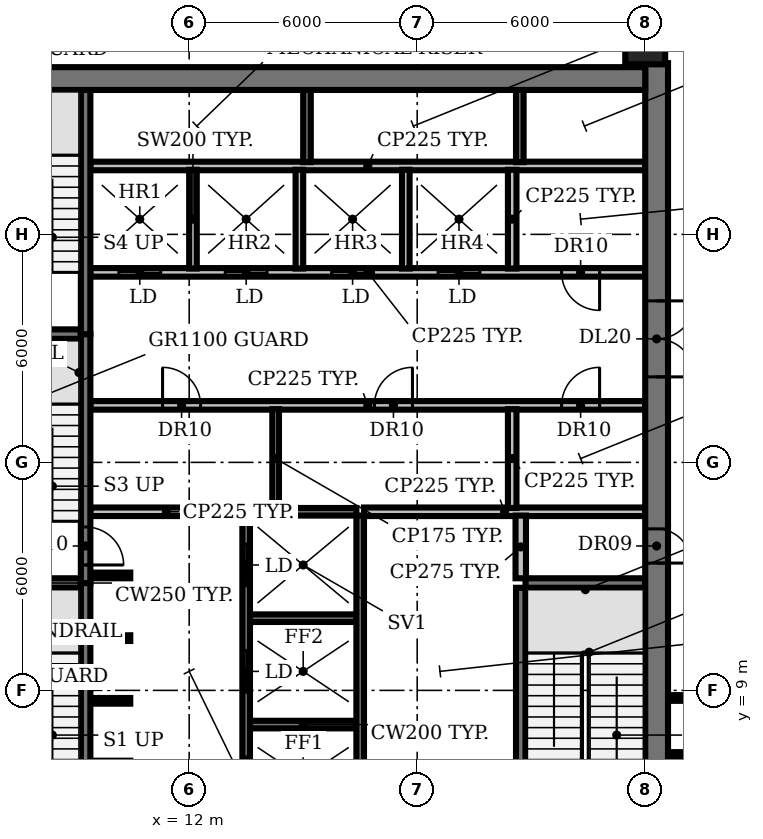
"""IFC4 building model, lengths in metres.
Left out: names, types, materials, properties, quantities, classifications, styles, units other than length and angle.
Written with IfcOpenShell. Run it as: python <this file> out.ifc"""

import sys

from ifc_helpers import new_model, si_unit, direction, frame, frame_2d, origin, origin_2d, place, context, subcontext, project, spatial, rectangle, circle, extrude, element, fill, save


model = new_model("IFC4")
c1 = context("Model", 3, precision=1e-05, world=origin(), true_north=direction((0.0, 1.0)))
c2 = subcontext(c1, "Body", "Model", "MODEL_VIEW")
j1 = project(units=[si_unit("LENGTHUNIT", "METRE"), si_unit("PLANEANGLEUNIT", "RADIAN")], contexts=[c1])
p1 = place(None, origin())
s1 = spatial("IfcSite", under=j1, at=p1, CompositionType="ELEMENT")
p2 = place(p1, origin())
s2 = spatial("IfcBuilding", under=s1, at=p2, CompositionType="ELEMENT")
p3 = place(p2, frame((0.0, 0.0, 146.6)))
s3 = spatial("IfcBuildingStorey", under=s2, at=p3, CompositionType="ELEMENT", Elevation=146.6)
p4 = place(p3, frame((24.0, 26.0, -0.35), z_axis=(0.0, 0.0, 1.0), x_axis=(1.0, 0.0, 0.0)))
e1 = element("IfcColumn", 1, at=p4, inside=s3, PredefinedType="COLUMN", context=c2, shape_type="SweptSolid", body=[
    extrude(circle(Radius=0.525, at=origin_2d()), origin(), (0.0, 0.0, 1.0), 4.2),
])
p5 = place(p3, frame((13.6, 8.1, 0.0), z_axis=(0.0, 0.0, 1.0), x_axis=(1.0, 0.0, 0.0)))
e2 = element("IfcWall", 2, at=p5, inside=s3, PredefinedType="SHEAR", context=c2, shape_type="SweptSolid", body=[
    extrude(rectangle(XDim=2.8, YDim=0.2, at=frame_2d((1.4, 0.0))), origin(), (0.0, 0.0, 1.0), 3.85),
])
for number, where, z_axis, x_axis in (
    (3, (9.4, 8.725, 0.0), (0.0, 0.0, 1.0), (1.0, 0.0, 0.0)),
    (4, (9.4, 10.375, 0.0), (0.0, 0.0, 1.0), (1.0, 0.0, 0.0)),
):
    element("IfcWall", number, at=place(p3, frame(where, z_axis=z_axis, x_axis=x_axis)), inside=s3, PredefinedType="SHEAR", context=c2, shape_type="SweptSolid", body=[
        extrude(rectangle(XDim=1.05, YDim=0.15, at=frame_2d((0.525, 0.0))), origin(), (0.0, 0.0, 1.0), 3.85),
    ])
p6 = place(p3, frame((13.6, 10.9, 0.0), z_axis=(0.0, 0.0, 1.0), x_axis=(1.0, 0.0, 0.0)))
e5 = element("IfcWall", 5, at=p6, inside=s3, PredefinedType="SHEAR", context=c2, shape_type="SweptSolid", body=[
    extrude(rectangle(XDim=2.8, YDim=0.2, at=frame_2d((1.4, 0.0))), origin(), (0.0, 0.0, 1.0), 3.85),
])
for number, where, z_axis, x_axis in (
    (6, (6.0, 11.825, 0.0), (0.0, 0.0, 1.0), (1.0, 0.0, 0.0)),
    (7, (20.85, 11.825, 0.0), (0.0, 0.0, 1.0), (1.0, 0.0, 0.0)),
):
    element("IfcWall", number, at=place(p3, frame(where, z_axis=z_axis, x_axis=x_axis)), inside=s3, PredefinedType="SHEAR", context=c2, shape_type="SweptSolid", body=[
        extrude(rectangle(XDim=3.15, YDim=0.25, at=frame_2d((1.575, 0.0))), origin(), (0.0, 0.0, 1.0), 3.85),
    ])
p7 = place(p3, frame((9.4, 12.025, 0.0), z_axis=(0.0, 0.0, 1.0), x_axis=(1.0, 0.0, 0.0)))
e8 = element("IfcWall", 8, at=p7, inside=s3, PredefinedType="SHEAR", context=c2, shape_type="SweptSolid", body=[
    extrude(rectangle(XDim=1.05, YDim=0.15, at=frame_2d((0.525, 0.0))), origin(), (0.0, 0.0, 1.0), 3.85),
])
p8 = place(p3, frame((9.4, 13.7, 0.0), z_axis=(0.0, 0.0, 1.0), x_axis=(1.0, 0.0, 0.0)))
e9 = element("IfcWall", 9, at=p8, inside=s3, PredefinedType="PARTITIONING", context=c2, shape_type="SweptSolid", body=[
    extrude(rectangle(XDim=4.0, YDim=0.225, at=frame_2d((2.0, 0.0))), origin(), (0.0, 0.0, 1.0), 3.85),
])
p9 = place(p3, frame((13.6, 13.7, 0.0), z_axis=(0.0, 0.0, 1.0), x_axis=(1.0, 0.0, 0.0)))
e10 = element("IfcWall", 10, at=p9, inside=s3, PredefinedType="SHEAR", context=c2, shape_type="SweptSolid", body=[
    extrude(rectangle(XDim=2.8, YDim=0.2, at=frame_2d((1.4, 0.0))), origin(), (0.0, 0.0, 1.0), 3.85),
])
p10 = place(p3, frame((16.6, 13.7, 0.0), z_axis=(0.0, 0.0, 1.0), x_axis=(1.0, 0.0, 0.0)))
e11 = element("IfcWall", 11, at=p10, inside=s3, PredefinedType="PARTITIONING", context=c2, shape_type="SweptSolid", body=[
    extrude(rectangle(XDim=7.4, YDim=0.225, at=frame_2d((3.7, 0.0))), origin(), (0.0, 0.0, 1.0), 3.85),
])
p11 = place(p3, frame((9.4, 16.5, 0.0), z_axis=(0.0, 0.0, 1.0), x_axis=(1.0, 0.0, 0.0)))
e12 = element("IfcWall", 12, at=p11, inside=s3, PredefinedType="PARTITIONING", context=c2, shape_type="SweptSolid", body=[
    extrude(rectangle(XDim=14.6, YDim=0.225, at=frame_2d((7.3, 0.0))), origin(), (0.0, 0.0, 1.0), 3.85),
])
p12 = place(p11, frame((1.9, 0.0, 0.0)))
e13 = element("IfcOpeningElement", 13, at=p12, cuts=e12, PredefinedType="OPENING", context=c2, shape_type="SweptSolid", body=[
    extrude(rectangle(XDim=1.0, YDim=2.1, at=frame_2d((0.5, 1.05))), frame((0.0, 0.123, 0.0), z_axis=(0.0, -1.0, 0.0), x_axis=(1.0, 0.0, 0.0)), (0.0, 0.0, 1.0), 0.245),
])
p13 = place(p11, frame((7.475, 0.0, 0.0)))
e14 = element("IfcOpeningElement", 14, at=p13, cuts=e12, PredefinedType="OPENING", context=c2, shape_type="SweptSolid", body=[
    extrude(rectangle(XDim=1.0, YDim=2.1, at=frame_2d((0.5, 1.05))), frame((0.0, 0.123, 0.0), z_axis=(0.0, -1.0, 0.0), x_axis=(1.0, 0.0, 0.0)), (0.0, 0.0, 1.0), 0.245),
])
p14 = place(p11, frame((12.4, 0.0, 0.0)))
e15 = element("IfcOpeningElement", 15, at=p14, cuts=e12, PredefinedType="OPENING", context=c2, shape_type="SweptSolid", body=[
    extrude(rectangle(XDim=1.0, YDim=2.1, at=frame_2d((0.5, 1.05))), frame((0.0, 0.123, 0.0), z_axis=(0.0, -1.0, 0.0), x_axis=(1.0, 0.0, 0.0)), (0.0, 0.0, 1.0), 0.245),
])
p15 = place(p3, frame((6.0, 18.375, 0.0), z_axis=(0.0, 0.0, 1.0), x_axis=(1.0, 0.0, 0.0)))
e16 = element("IfcWall", 16, at=p15, inside=s3, PredefinedType="SHEAR", context=c2, shape_type="SweptSolid", body=[
    extrude(rectangle(XDim=3.15, YDim=0.25, at=frame_2d((1.575, 0.0))), origin(), (0.0, 0.0, 1.0), 3.85),
])
p16 = place(p3, frame((24.0, 20.0, 0.0), z_axis=(0.0, 0.0, 1.0), x_axis=(-1.0, 0.0, 0.0)))
e17 = element("IfcWall", 17, at=p16, inside=s3, PredefinedType="PARTITIONING", context=c2, shape_type="SweptSolid", body=[
    extrude(rectangle(XDim=14.6, YDim=0.225, at=frame_2d((7.3, 0.0))), origin(), (0.0, 0.0, 1.0), 3.85),
])
p17 = place(p16, frame((12.75, 0.0, 0.0)))
e18 = element("IfcOpeningElement", 18, at=p17, cuts=e17, PredefinedType="OPENING", context=c2, shape_type="SweptSolid", body=[
    extrude(rectangle(XDim=1.1, YDim=2.1, at=frame_2d((0.55, 1.05))), frame((0.0, 0.123, 0.0), z_axis=(0.0, -1.0, 0.0), x_axis=(1.0, 0.0, 0.0)), (0.0, 0.0, 1.0), 0.245),
])
p18 = place(p16, frame((9.95, 0.0, 0.0)))
e19 = element("IfcOpeningElement", 19, at=p18, cuts=e17, PredefinedType="OPENING", context=c2, shape_type="SweptSolid", body=[
    extrude(rectangle(XDim=1.1, YDim=2.1, at=frame_2d((0.55, 1.05))), frame((0.0, 0.123, 0.0), z_axis=(0.0, -1.0, 0.0), x_axis=(1.0, 0.0, 0.0)), (0.0, 0.0, 1.0), 0.245),
])
p19 = place(p16, frame((7.15, 0.0, 0.0)))
e20 = element("IfcOpeningElement", 20, at=p19, cuts=e17, PredefinedType="OPENING", context=c2, shape_type="SweptSolid", body=[
    extrude(rectangle(XDim=1.1, YDim=2.1, at=frame_2d((0.55, 1.05))), frame((0.0, 0.123, 0.0), z_axis=(0.0, -1.0, 0.0), x_axis=(1.0, 0.0, 0.0)), (0.0, 0.0, 1.0), 0.245),
])
p20 = place(p16, frame((4.35, 0.0, 0.0)))
e21 = element("IfcOpeningElement", 21, at=p20, cuts=e17, PredefinedType="OPENING", context=c2, shape_type="SweptSolid", body=[
    extrude(rectangle(XDim=1.1, YDim=2.1, at=frame_2d((0.55, 1.05))), frame((0.0, 0.123, 0.0), z_axis=(0.0, -1.0, 0.0), x_axis=(1.0, 0.0, 0.0)), (0.0, 0.0, 1.0), 0.245),
])
p21 = place(p16, frame((1.2, 0.0, 0.0)))
e22 = element("IfcOpeningElement", 22, at=p21, cuts=e17, PredefinedType="OPENING", context=c2, shape_type="SweptSolid", body=[
    extrude(rectangle(XDim=1.0, YDim=2.1, at=frame_2d((0.5, 1.05))), frame((0.0, 0.123, 0.0), z_axis=(0.0, -1.0, 0.0), x_axis=(1.0, 0.0, 0.0)), (0.0, 0.0, 1.0), 0.245),
])
p22 = place(p3, frame((9.4, 22.8, 0.0), z_axis=(0.0, 0.0, 1.0), x_axis=(1.0, 0.0, 0.0)))
e23 = element("IfcWall", 23, at=p22, inside=s3, PredefinedType="PARTITIONING", context=c2, shape_type="SweptSolid", body=[
    extrude(rectangle(XDim=14.6, YDim=0.225, at=frame_2d((7.3, 0.0))), origin(), (0.0, 0.0, 1.0), 3.85),
])
p23 = place(p3, frame((9.275, 11.825, 0.0), z_axis=(0.0, 0.0, 1.0), x_axis=(0.0, -1.0, 0.0)))
e24 = element("IfcWall", 24, at=p23, inside=s3, PredefinedType="SHEAR", context=c2, shape_type="SweptSolid", body=[
    extrude(rectangle(XDim=6.425, YDim=0.25, at=frame_2d((3.212, 0.0))), origin(), (0.0, 0.0, 1.0), 3.85),
])
p24 = place(p23, frame((5.075, 0.0, 0.0)))
e25 = element("IfcOpeningElement", 25, at=p24, cuts=e24, PredefinedType="OPENING", context=c2, shape_type="SweptSolid", body=[
    extrude(rectangle(XDim=1.0, YDim=2.1, at=frame_2d((0.5, 1.05))), frame((0.0, 0.135, 0.0), z_axis=(0.0, -1.0, 0.0), x_axis=(1.0, 0.0, 0.0)), (0.0, 0.0, 1.0), 0.27),
])
p25 = place(p3, frame((9.275, 18.375, 0.0), z_axis=(0.0, 0.0, 1.0), x_axis=(0.0, -1.0, 0.0)))
e26 = element("IfcWall", 26, at=p25, inside=s3, PredefinedType="SHEAR", context=c2, shape_type="SweptSolid", body=[
    extrude(rectangle(XDim=6.55, YDim=0.25, at=frame_2d((3.275, 0.0))), origin(), (0.0, 0.0, 1.0), 3.85),
])
p26 = place(p25, frame((5.075, 0.0, 0.0)))
e27 = element("IfcOpeningElement", 27, at=p26, cuts=e26, PredefinedType="OPENING", context=c2, shape_type="SweptSolid", body=[
    extrude(rectangle(XDim=1.0, YDim=2.1, at=frame_2d((0.5, 1.05))), frame((0.0, 0.135, 0.0), z_axis=(0.0, -1.0, 0.0), x_axis=(1.0, 0.0, 0.0)), (0.0, 0.0, 1.0), 0.27),
])
p27 = place(p3, frame((9.275, 18.375, 0.0), z_axis=(0.0, 0.0, 1.0), x_axis=(0.0, 1.0, 0.0)))
e28 = element("IfcWall", 28, at=p27, inside=s3, PredefinedType="SHEAR", context=c2, shape_type="SweptSolid", body=[
    extrude(rectangle(XDim=6.425, YDim=0.25, at=frame_2d((3.212, 0.0))), origin(), (0.0, 0.0, 1.0), 3.85),
])
p28 = place(p3, frame((12.1, 20.1, 0.0), z_axis=(0.0, 0.0, 1.0), x_axis=(0.0, 1.0, 0.0)))
e29 = element("IfcWall", 29, at=p28, inside=s3, PredefinedType="SOLIDWALL", context=c2, shape_type="SweptSolid", body=[
    extrude(rectangle(XDim=2.6, YDim=0.2, at=frame_2d((1.3, 0.0))), origin(), (0.0, 0.0, 1.0), 3.85),
])
p29 = place(p3, frame((13.5, 5.4, 0.0), z_axis=(0.0, 0.0, 1.0), x_axis=(0.0, 1.0, 0.0)))
e30 = element("IfcWall", 30, at=p29, inside=s3, PredefinedType="SHEAR", context=c2, shape_type="SweptSolid", body=[
    extrude(rectangle(XDim=8.2, YDim=0.2, at=frame_2d((4.1, 0.0))), origin(), (0.0, 0.0, 1.0), 3.85),
])
p30 = place(p29, frame((0.75, 0.0, 0.0)))
e31 = element("IfcOpeningElement", 31, at=p30, cuts=e30, PredefinedType="OPENING", context=c2, shape_type="SweptSolid", body=[
    extrude(rectangle(XDim=1.1, YDim=2.1, at=frame_2d((0.55, 1.05))), frame((0.0, 0.11, 0.0), z_axis=(0.0, -1.0, 0.0), x_axis=(1.0, 0.0, 0.0)), (0.0, 0.0, 1.0), 0.22),
])
p31 = place(p29, frame((3.55, 0.0, 0.0)))
e32 = element("IfcOpeningElement", 32, at=p31, cuts=e30, PredefinedType="OPENING", context=c2, shape_type="SweptSolid", body=[
    extrude(rectangle(XDim=1.1, YDim=2.1, at=frame_2d((0.55, 1.05))), frame((0.0, 0.11, 0.0), z_axis=(0.0, -1.0, 0.0), x_axis=(1.0, 0.0, 0.0)), (0.0, 0.0, 1.0), 0.22),
])
p32 = place(p29, frame((6.35, 0.0, 0.0)))
e33 = element("IfcOpeningElement", 33, at=p32, cuts=e30, PredefinedType="OPENING", context=c2, shape_type="SweptSolid", body=[
    extrude(rectangle(XDim=1.1, YDim=2.1, at=frame_2d((0.55, 1.05))), frame((0.0, 0.11, 0.0), z_axis=(0.0, -1.0, 0.0), x_axis=(1.0, 0.0, 0.0)), (0.0, 0.0, 1.0), 0.22),
])
p33 = place(p3, frame((14.275, 13.8, 0.0), z_axis=(0.0, 0.0, 1.0), x_axis=(0.0, 1.0, 0.0)))
e34 = element("IfcWall", 34, at=p33, inside=s3, PredefinedType="PARTITIONING", context=c2, shape_type="SweptSolid", body=[
    extrude(rectangle(XDim=2.6, YDim=0.175, at=frame_2d((1.3, 0.0))), origin(), (0.0, 0.0, 1.0), 3.85),
])
p34 = place(p3, frame((14.9, 20.1, 0.0), z_axis=(0.0, 0.0, 1.0), x_axis=(0.0, 1.0, 0.0)))
e35 = element("IfcWall", 35, at=p34, inside=s3, PredefinedType="SOLIDWALL", context=c2, shape_type="SweptSolid", body=[
    extrude(rectangle(XDim=2.6, YDim=0.2, at=frame_2d((1.3, 0.0))), origin(), (0.0, 0.0, 1.0), 3.85),
])
p35 = place(p3, frame((15.1, 22.9, 0.0), z_axis=(0.0, 0.0, 1.0), x_axis=(0.0, 1.0, 0.0)))
e36 = element("IfcWall", 36, at=p35, inside=s3, PredefinedType="SHEAR", context=c2, shape_type="SweptSolid", body=[
    extrude(rectangle(XDim=1.9, YDim=0.2, at=frame_2d((0.95, 0.0))), origin(), (0.0, 0.0, 1.0), 3.85),
])
p36 = place(p3, frame((16.5, 5.4, 0.0), z_axis=(0.0, 0.0, 1.0), x_axis=(0.0, 1.0, 0.0)))
e37 = element("IfcWall", 37, at=p36, inside=s3, PredefinedType="SHEAR", context=c2, shape_type="SweptSolid", body=[
    extrude(rectangle(XDim=8.2, YDim=0.2, at=frame_2d((4.1, 0.0))), origin(), (0.0, 0.0, 1.0), 3.85),
])
p37 = place(p3, frame((17.7, 20.1, 0.0), z_axis=(0.0, 0.0, 1.0), x_axis=(0.0, 1.0, 0.0)))
e38 = element("IfcWall", 38, at=p37, inside=s3, PredefinedType="SOLIDWALL", context=c2, shape_type="SweptSolid", body=[
    extrude(rectangle(XDim=2.6, YDim=0.2, at=frame_2d((1.3, 0.0))), origin(), (0.0, 0.0, 1.0), 3.85),
])
for number, where, z_axis, x_axis in (
    (39, (20.5, 13.8, 0.0), (0.0, 0.0, 1.0), (0.0, 1.0, 0.0)),
    (40, (20.5, 20.1, 0.0), (0.0, 0.0, 1.0), (0.0, 1.0, 0.0)),
):
    element("IfcWall", number, at=place(p3, frame(where, z_axis=z_axis, x_axis=x_axis)), inside=s3, PredefinedType="PARTITIONING", context=c2, shape_type="SweptSolid", body=[
        extrude(rectangle(XDim=2.6, YDim=0.225, at=frame_2d((1.3, 0.0))), origin(), (0.0, 0.0, 1.0), 3.85),
    ])
p38 = place(p3, frame((20.7, 22.9, 0.0), z_axis=(0.0, 0.0, 1.0), x_axis=(0.0, 1.0, 0.0)))
e41 = element("IfcWall", 41, at=p38, inside=s3, PredefinedType="SHEAR", context=c2, shape_type="SweptSolid", body=[
    extrude(rectangle(XDim=1.9, YDim=0.2, at=frame_2d((0.95, 0.0))), origin(), (0.0, 0.0, 1.0), 3.85),
])
p39 = place(p3, frame((20.725, 5.4, 0.0), z_axis=(0.0, 0.0, 1.0), x_axis=(0.0, 1.0, 0.0)))
e42 = element("IfcWall", 42, at=p39, inside=s3, PredefinedType="SHEAR", context=c2, shape_type="SweptSolid", body=[
    extrude(rectangle(XDim=6.3, YDim=0.25, at=frame_2d((3.15, 0.0))), origin(), (0.0, 0.0, 1.0), 3.85),
])
p40 = place(p3, frame((20.725, 11.95, 0.0), z_axis=(0.0, 0.0, 1.0), x_axis=(0.0, 1.0, 0.0)))
e43 = element("IfcWall", 43, at=p40, inside=s3, PredefinedType="PARTITIONING", context=c2, shape_type="SweptSolid", body=[
    extrude(rectangle(XDim=1.65, YDim=0.275, at=frame_2d((0.825, 0.0))), origin(), (0.0, 0.0, 1.0), 3.85),
])
p41 = place(p3, frame((24.3, 25.505, 0.0), z_axis=(0.0, 0.0, 1.0), x_axis=(0.0, -1.0, 0.0)))
e44 = element("IfcWall", 44, at=p41, inside=s3, PredefinedType="SHEAR", context=c2, shape_type="SweptSolid", body=[
    extrude(rectangle(XDim=20.705, YDim=0.6, at=frame_2d((10.353, 0.0))), origin(), (0.0, 0.0, 1.0), 3.85),
])
p42 = place(p41, frame((18.355, 0.0, 0.0)))
e45 = element("IfcOpeningElement", 45, at=p42, cuts=e44, PredefinedType="OPENING", context=c2, shape_type="SweptSolid", body=[
    extrude(rectangle(XDim=1.5, YDim=2.1, at=frame_2d((0.75, 1.05))), frame((0.0, 0.31, 0.0), z_axis=(0.0, -1.0, 0.0), x_axis=(1.0, 0.0, 0.0)), (0.0, 0.0, 1.0), 0.62),
])
p43 = place(p41, frame((12.255, 0.0, 0.0)))
e46 = element("IfcOpeningElement", 46, at=p43, cuts=e44, PredefinedType="OPENING", context=c2, shape_type="SweptSolid", body=[
    extrude(rectangle(XDim=0.9, YDim=2.1, at=frame_2d((0.45, 1.05))), frame((0.0, 0.31, 0.0), z_axis=(0.0, -1.0, 0.0), x_axis=(1.0, 0.0, 0.0)), (0.0, 0.0, 1.0), 0.62),
])
p44 = place(p41, frame((6.255, 0.0, 0.0)))
e47 = element("IfcOpeningElement", 47, at=p44, cuts=e44, PredefinedType="OPENING", context=c2, shape_type="SweptSolid", body=[
    extrude(rectangle(XDim=2.0, YDim=2.1, at=frame_2d((1.0, 1.05))), frame((0.0, 0.31, 0.0), z_axis=(0.0, -1.0, 0.0), x_axis=(1.0, 0.0, 0.0)), (0.0, 0.0, 1.0), 0.62),
])
p45 = place(p3, frame((6.0, 25.1, 0.0), z_axis=(0.0, 0.0, 1.0), x_axis=(1.0, 0.0, 0.0)))
e48 = element("IfcWall", 48, at=p45, inside=s3, PredefinedType="SHEAR", context=c2, shape_type="SweptSolid", body=[
    extrude(rectangle(XDim=18.0, YDim=0.6, at=frame_2d((9.0, 0.0))), origin(), (0.0, 0.0, 1.0), 3.85),
])
p46 = place(p3, frame((24.0, 25.5, 0.0), z_axis=(0.0, 0.0, 1.0), x_axis=(0.0, 1.0, 0.0)))
e49 = element("IfcWall", 49, at=p46, inside=s3, PredefinedType="PARTITIONING", context=c2, shape_type="SweptSolid", body=[
    extrude(rectangle(XDim=1.08, YDim=0.15, at=frame_2d((0.54, 0.0))), origin(), (0.0, 0.0, 1.0), 2.88),
])
for number, where, z_axis, x_axis in (
    (50, (24.6, 7.3, 0.0), (0.0, 0.0, 1.0), (1.0, 0.0, 0.0)),
    (51, (24.6, 8.8, 0.0), (0.0, 0.0, 1.0), (1.0, 0.0, 0.0)),
):
    element("IfcWall", number, at=place(p3, frame(where, z_axis=z_axis, x_axis=x_axis)), inside=s3, PredefinedType="PARTITIONING", context=c2, shape_type="SweptSolid", body=[
        extrude(rectangle(XDim=1.05, YDim=0.15, at=frame_2d((0.525, 0.0))), origin(), (0.0, 0.0, 1.0), 2.88),
    ])
p47 = place(p12, origin())
e52 = element("IfcDoor", 52, at=p47, inside=s3, OperationType="SINGLE_SWING_LEFT", PredefinedType="DOOR", context=c2, shape_type="SweptSolid", body=[
    extrude(rectangle(XDim=1.0, YDim=2.1, at=frame_2d((0.5, 1.05))), frame((0.0, 0.025, 0.0), z_axis=(0.0, -1.0, 0.0), x_axis=(1.0, 0.0, 0.0)), (0.0, 0.0, 1.0), 0.05),
])
fill(e13, e52)
p48 = place(p13, origin())
e53 = element("IfcDoor", 53, at=p48, inside=s3, OperationType="SINGLE_SWING_RIGHT", PredefinedType="DOOR", context=c2, shape_type="SweptSolid", body=[
    extrude(rectangle(XDim=1.0, YDim=2.1, at=frame_2d((0.5, 1.05))), frame((0.0, 0.025, 0.0), z_axis=(0.0, -1.0, 0.0), x_axis=(1.0, 0.0, 0.0)), (0.0, 0.0, 1.0), 0.05),
])
fill(e14, e53)
p49 = place(p14, origin())
e54 = element("IfcDoor", 54, at=p49, inside=s3, OperationType="SINGLE_SWING_RIGHT", PredefinedType="DOOR", context=c2, shape_type="SweptSolid", body=[
    extrude(rectangle(XDim=1.0, YDim=2.1, at=frame_2d((0.5, 1.05))), frame((0.0, 0.025, 0.0), z_axis=(0.0, -1.0, 0.0), x_axis=(1.0, 0.0, 0.0)), (0.0, 0.0, 1.0), 0.05),
])
fill(e15, e54)
p50 = place(p17, origin())
e55 = element("IfcDoor", 55, at=p50, inside=s3, OperationType="DOUBLE_DOOR_SLIDING", PredefinedType="DOOR", context=c2, shape_type="SweptSolid", body=[
    extrude(rectangle(XDim=1.1, YDim=2.1, at=frame_2d((0.55, 1.05))), frame((0.0, 0.025, 0.0), z_axis=(0.0, -1.0, 0.0), x_axis=(1.0, 0.0, 0.0)), (0.0, 0.0, 1.0), 0.05),
])
fill(e18, e55)
p51 = place(p18, origin())
e56 = element("IfcDoor", 56, at=p51, inside=s3, OperationType="DOUBLE_DOOR_SLIDING", PredefinedType="DOOR", context=c2, shape_type="SweptSolid", body=[
    extrude(rectangle(XDim=1.1, YDim=2.1, at=frame_2d((0.55, 1.05))), frame((0.0, 0.025, 0.0), z_axis=(0.0, -1.0, 0.0), x_axis=(1.0, 0.0, 0.0)), (0.0, 0.0, 1.0), 0.05),
])
fill(e19, e56)
p52 = place(p19, origin())
e57 = element("IfcDoor", 57, at=p52, inside=s3, OperationType="DOUBLE_DOOR_SLIDING", PredefinedType="DOOR", context=c2, shape_type="SweptSolid", body=[
    extrude(rectangle(XDim=1.1, YDim=2.1, at=frame_2d((0.55, 1.05))), frame((0.0, 0.025, 0.0), z_axis=(0.0, -1.0, 0.0), x_axis=(1.0, 0.0, 0.0)), (0.0, 0.0, 1.0), 0.05),
])
fill(e20, e57)
p53 = place(p20, origin())
e58 = element("IfcDoor", 58, at=p53, inside=s3, OperationType="DOUBLE_DOOR_SLIDING", PredefinedType="DOOR", context=c2, shape_type="SweptSolid", body=[
    extrude(rectangle(XDim=1.1, YDim=2.1, at=frame_2d((0.55, 1.05))), frame((0.0, 0.025, 0.0), z_axis=(0.0, -1.0, 0.0), x_axis=(1.0, 0.0, 0.0)), (0.0, 0.0, 1.0), 0.05),
])
fill(e21, e58)
p54 = place(p21, origin())
e59 = element("IfcDoor", 59, at=p54, inside=s3, OperationType="SINGLE_SWING_LEFT", PredefinedType="DOOR", context=c2, shape_type="SweptSolid", body=[
    extrude(rectangle(XDim=1.0, YDim=2.1, at=frame_2d((0.5, 1.05))), frame((0.0, 0.025, 0.0), z_axis=(0.0, -1.0, 0.0), x_axis=(1.0, 0.0, 0.0)), (0.0, 0.0, 1.0), 0.05),
])
fill(e22, e59)
p55 = place(p26, origin())
e60 = element("IfcDoor", 60, at=p55, inside=s3, OperationType="SINGLE_SWING_RIGHT", PredefinedType="DOOR", context=c2, shape_type="SweptSolid", body=[
    extrude(rectangle(XDim=1.0, YDim=2.1, at=frame_2d((0.5, 1.05))), frame((0.0, 0.025, 0.0), z_axis=(0.0, -1.0, 0.0), x_axis=(1.0, 0.0, 0.0)), (0.0, 0.0, 1.0), 0.05),
])
fill(e27, e60)
p56 = place(p30, origin())
e61 = element("IfcDoor", 61, at=p56, inside=s3, OperationType="DOUBLE_DOOR_SLIDING", PredefinedType="DOOR", context=c2, shape_type="SweptSolid", body=[
    extrude(rectangle(XDim=1.1, YDim=2.1, at=frame_2d((0.55, 1.05))), frame((0.0, 0.025, 0.0), z_axis=(0.0, -1.0, 0.0), x_axis=(1.0, 0.0, 0.0)), (0.0, 0.0, 1.0), 0.05),
])
fill(e31, e61)
p57 = place(p31, origin())
e62 = element("IfcDoor", 62, at=p57, inside=s3, OperationType="DOUBLE_DOOR_SLIDING", PredefinedType="DOOR", context=c2, shape_type="SweptSolid", body=[
    extrude(rectangle(XDim=1.1, YDim=2.1, at=frame_2d((0.55, 1.05))), frame((0.0, 0.025, 0.0), z_axis=(0.0, -1.0, 0.0), x_axis=(1.0, 0.0, 0.0)), (0.0, 0.0, 1.0), 0.05),
])
fill(e32, e62)
p58 = place(p32, origin())
e63 = element("IfcDoor", 63, at=p58, inside=s3, OperationType="DOUBLE_DOOR_SLIDING", PredefinedType="DOOR", context=c2, shape_type="SweptSolid", body=[
    extrude(rectangle(XDim=1.1, YDim=2.1, at=frame_2d((0.55, 1.05))), frame((0.0, 0.025, 0.0), z_axis=(0.0, -1.0, 0.0), x_axis=(1.0, 0.0, 0.0)), (0.0, 0.0, 1.0), 0.05),
])
fill(e33, e63)
p59 = place(p43, origin())
e64 = element("IfcDoor", 64, at=p59, inside=s3, OperationType="SINGLE_SWING_RIGHT", PredefinedType="DOOR", context=c2, shape_type="SweptSolid", body=[
    extrude(rectangle(XDim=0.9, YDim=2.1, at=frame_2d((0.45, 1.05))), frame((0.0, -0.24, 0.0), z_axis=(0.0, -1.0, 0.0), x_axis=(1.0, 0.0, 0.0)), (0.0, 0.0, 1.0), 0.05),
])
fill(e46, e64)
p60 = place(p44, origin())
e65 = element("IfcDoor", 65, at=p60, inside=s3, OperationType="DOUBLE_DOOR_SINGLE_SWING", PredefinedType="DOOR", context=c2, shape_type="SweptSolid", body=[
    extrude(rectangle(XDim=2.0, YDim=2.1, at=frame_2d((1.0, 1.05))), frame((0.0, 0.025, 0.0), z_axis=(0.0, -1.0, 0.0), x_axis=(1.0, 0.0, 0.0)), (0.0, 0.0, 1.0), 0.05),
])
fill(e47, e65)
save(model, sys.argv[1])
